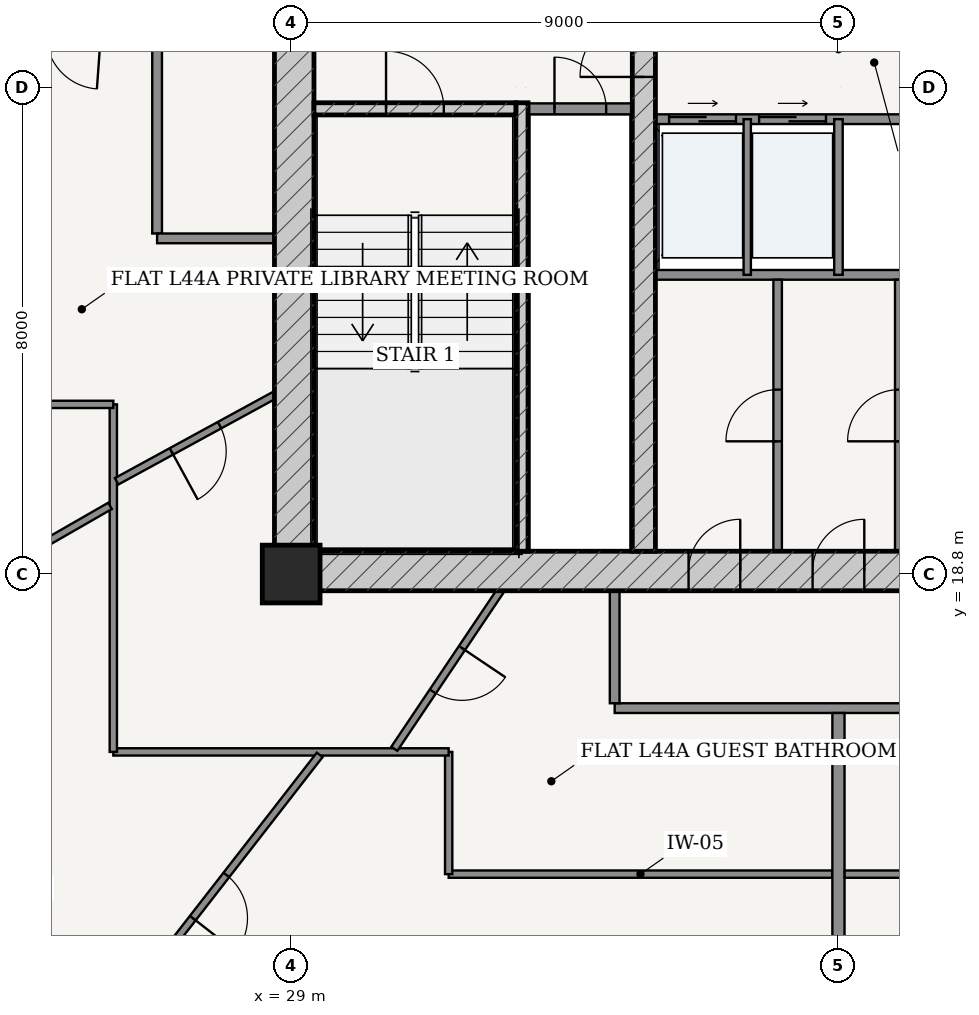
"""IFC4 building model, lengths in metres.
Left out: names, types, materials, properties, quantities, classifications, styles, units other than length and angle.
Written with IfcOpenShell. Run it as: python <this file> out.ifc"""

import sys

from ifc_helpers import new_model, si_unit, direction, frame, frame_2d, origin, origin_2d, place, context, subcontext, project, spatial, rectangle, extrude, source, transform, mapped, element, fill, save


model = new_model("IFC4")
c1 = context("Model", 3, precision=1e-05, world=origin(), true_north=direction((-0.2419218956, 0.970295726276)))
c2 = subcontext(c1, "Body", "Model", "MODEL_VIEW")
j1 = project(units=[si_unit("LENGTHUNIT", "METRE"), si_unit("PLANEANGLEUNIT", "RADIAN")], contexts=[c1])
p1 = place(None, origin())
s1 = spatial("IfcSite", under=j1, at=p1, CompositionType="ELEMENT")
p2 = place(p1, origin())
s2 = spatial("IfcBuilding", under=s1, at=p2, CompositionType="ELEMENT")
p3 = place(p2, frame((0.0, 0.0, 167.8)))
s3 = spatial("IfcBuildingStorey", under=s2, at=p3, CompositionType="ELEMENT", Elevation=167.8)
p4 = place(p3, frame((29.0, 18.8, 0.0), z_axis=(0.0, 0.0, 1.0), x_axis=(1.0, 0.0, 0.0)))
e1 = element("IfcColumn", 1, at=p4, inside=s3, PredefinedType="COLUMN", context=c2, shape_type="SweptSolid", body=[
    extrude(rectangle(XDim=0.95, YDim=0.95, at=origin_2d()), origin(), (0.0, 0.0, 1.0), 3.6),
])
p5 = place(p3, frame((28.725, 18.85, 0.0), z_axis=(0.0, 0.0, 1.0), x_axis=(1.0, 0.0, 0.0)))
e2 = element("IfcWall", 2, at=p5, inside=s3, PredefinedType="SHEAR", context=c2, shape_type="SweptSolid", body=[
    extrude(rectangle(XDim=18.55, YDim=0.65, at=frame_2d((9.275, 0.0))), origin(), (0.0, 0.0, 1.0), 3.33),
])
p6 = place(p5, frame((6.81, 0.0, 0.0)))
e3 = element("IfcOpeningElement", 3, at=p6, cuts=e2, PredefinedType="OPENING", context=c2, shape_type="SweptSolid", body=[
    extrude(rectangle(XDim=0.85, YDim=2.1, at=frame_2d((0.425, 1.05))), frame((0.0, 0.335, 0.0), z_axis=(0.0, -1.0, 0.0), x_axis=(1.0, 0.0, 0.0)), (0.0, 0.0, 1.0), 0.67),
])
p7 = place(p5, frame((8.85, 0.0, 0.0)))
e4 = element("IfcOpeningElement", 4, at=p7, cuts=e2, PredefinedType="OPENING", context=c2, shape_type="SweptSolid", body=[
    extrude(rectangle(XDim=0.85, YDim=2.1, at=frame_2d((0.425, 1.05))), frame((0.0, 0.335, 0.0), z_axis=(0.0, -1.0, 0.0), x_axis=(1.0, 0.0, 0.0)), (0.0, 0.0, 1.0), 0.67),
])
p8 = place(p5, frame((10.89, 0.0, 0.0)))
e5 = element("IfcOpeningElement", 5, at=p8, cuts=e2, PredefinedType="OPENING", context=c2, shape_type="SweptSolid", body=[
    extrude(rectangle(XDim=0.85, YDim=2.1, at=frame_2d((0.425, 1.05))), frame((0.0, 0.335, 0.0), z_axis=(0.0, -1.0, 0.0), x_axis=(1.0, 0.0, 0.0)), (0.0, 0.0, 1.0), 0.67),
])
p9 = place(p3, frame((29.05, 19.175, 0.0), z_axis=(0.0, 0.0, 1.0), x_axis=(0.0, 1.0, 0.0)))
e6 = element("IfcWall", 6, at=p9, inside=s3, PredefinedType="SHEAR", context=c2, shape_type="SweptSolid", body=[
    extrude(rectangle(XDim=15.25, YDim=0.65, at=frame_2d((7.625, 0.0))), origin(), (0.0, 0.0, 1.0), 3.33),
])
p10 = place(p9, frame((9.875, 0.0, 0.0)))
e7 = element("IfcOpeningElement", 7, at=p10, cuts=e6, PredefinedType="OPENING", context=c2, shape_type="SweptSolid", body=[
    extrude(rectangle(XDim=1.5, YDim=2.2, at=frame_2d((0.75, 1.1))), frame((0.0, 0.335, 0.0), z_axis=(0.0, -1.0, 0.0), x_axis=(1.0, 0.0, 0.0)), (0.0, 0.0, 1.0), 0.67),
])
p11 = place(p3, frame((32.795, 19.175, 0.0), z_axis=(0.0, 0.0, 1.0), x_axis=(0.0, 1.0, 0.0)))
e8 = element("IfcWall", 8, at=p11, inside=s3, PredefinedType="SOLIDWALL", context=c2, shape_type="SweptSolid", body=[
    extrude(rectangle(XDim=7.375, YDim=0.2, at=frame_2d((3.688, 0.0))), origin(), (0.0, 0.0, 1.0), 3.33),
])
p12 = place(p3, frame((29.375, 26.45, 0.0), z_axis=(0.0, 0.0, 1.0), x_axis=(1.0, 0.0, 0.0)))
e9 = element("IfcWall", 9, at=p12, inside=s3, PredefinedType="SOLIDWALL", context=c2, shape_type="SweptSolid", body=[
    extrude(rectangle(XDim=3.32, YDim=0.2, at=frame_2d((1.66, 0.0))), origin(), (0.0, 0.0, 1.0), 3.33),
])
p13 = place(p12, frame((1.185, 0.0, 0.0)))
e10 = element("IfcOpeningElement", 10, at=p13, cuts=e9, PredefinedType="OPENING", context=c2, shape_type="SweptSolid", body=[
    extrude(rectangle(XDim=0.95, YDim=2.15, at=frame_2d((0.475, 1.075))), frame((0.0, 0.11, 0.0), z_axis=(0.0, -1.0, 0.0), x_axis=(1.0, 0.0, 0.0)), (0.0, 0.0, 1.0), 0.22),
])
p14 = place(p3, frame((34.8, 19.175, 0.0), z_axis=(0.0, 0.0, 1.0), x_axis=(0.0, 1.0, 0.0)))
e11 = element("IfcWall", 11, at=p14, inside=s3, PredefinedType="SHEAR", context=c2, shape_type="SweptSolid", body=[
    extrude(rectangle(XDim=15.25, YDim=0.38, at=frame_2d((7.625, 0.0))), origin(), (0.0, 0.0, 1.0), 3.33),
])
p15 = place(p14, frame((7.8, 0.0, 0.0)))
e12 = element("IfcOpeningElement", 12, at=p15, cuts=e11, PredefinedType="OPENING", context=c2, shape_type="SweptSolid", body=[
    extrude(rectangle(XDim=1.05, YDim=2.15, at=frame_2d((0.525, 1.075))), frame((0.0, 0.2, 0.0), z_axis=(0.0, -1.0, 0.0), x_axis=(1.0, 0.0, 0.0)), (0.0, 0.0, 1.0), 0.4),
])
p16 = place(p3, frame((32.9, 26.45, 0.0), z_axis=(0.0, 0.0, 1.0), x_axis=(1.0, 0.0, 0.0)))
e13 = element("IfcWall", 13, at=p16, inside=s3, PredefinedType="PARTITIONING", context=c2, shape_type="SweptSolid", body=[
    extrude(rectangle(XDim=1.71, YDim=0.18, at=frame_2d((0.855, 0.0))), origin(), (0.0, 0.0, 1.0), 3.33),
])
p17 = place(p16, frame((0.43, 0.0, 0.0)))
e14 = element("IfcOpeningElement", 14, at=p17, cuts=e13, PredefinedType="OPENING", context=c2, shape_type="SweptSolid", body=[
    extrude(rectangle(XDim=0.85, YDim=2.1, at=frame_2d((0.425, 1.05))), frame((0.0, 0.1, 0.0), z_axis=(0.0, -1.0, 0.0), x_axis=(1.0, 0.0, 0.0)), (0.0, 0.0, 1.0), 0.2),
])
p18 = place(p3, frame((34.99, 26.28, 0.0), z_axis=(0.0, 0.0, 1.0), x_axis=(1.0, 0.0, 0.0)))
e15 = element("IfcWall", 15, at=p18, inside=s3, PredefinedType="PARTITIONING", context=c2, shape_type="SweptSolid", body=[
    extrude(rectangle(XDim=6.02, YDim=0.16, at=frame_2d((3.01, 0.0))), origin(), (0.0, 0.0, 1.0), 3.33),
])
p19 = place(p18, frame((0.225, 0.0, 0.0)))
e16 = element("IfcOpeningElement", 16, at=p19, cuts=e15, PredefinedType="OPENING", context=c2, shape_type="SweptSolid", body=[
    extrude(rectangle(XDim=1.1, YDim=2.2, at=frame_2d((0.55, 1.1))), frame((0.0, 0.09, 0.0), z_axis=(0.0, -1.0, 0.0), x_axis=(1.0, 0.0, 0.0)), (0.0, 0.0, 1.0), 0.18),
])
p20 = place(p18, frame((1.705, 0.0, 0.0)))
e17 = element("IfcOpeningElement", 17, at=p20, cuts=e15, PredefinedType="OPENING", context=c2, shape_type="SweptSolid", body=[
    extrude(rectangle(XDim=1.1, YDim=2.2, at=frame_2d((0.55, 1.1))), frame((0.0, 0.09, 0.0), z_axis=(0.0, -1.0, 0.0), x_axis=(1.0, 0.0, 0.0)), (0.0, 0.0, 1.0), 0.18),
])
p21 = place(p3, frame((34.99, 23.72, 0.0), z_axis=(0.0, 0.0, 1.0), x_axis=(1.0, 0.0, 0.0)))
e18 = element("IfcWall", 18, at=p21, inside=s3, PredefinedType="PARTITIONING", context=c2, shape_type="SweptSolid", body=[
    extrude(rectangle(XDim=6.02, YDim=0.16, at=frame_2d((3.01, 0.0))), origin(), (0.0, 0.0, 1.0), 3.33),
])
p22 = place(p3, frame((36.5, 23.72, 0.0), z_axis=(0.0, 0.0, 1.0), x_axis=(0.0, 1.0, 0.0)))
e19 = element("IfcWall", 19, at=p22, inside=s3, PredefinedType="PARTITIONING", context=c2, shape_type="SweptSolid", body=[
    extrude(rectangle(XDim=2.56, YDim=0.12, at=frame_2d((1.28, 0.0))), origin(), (0.0, 0.0, 1.0), 3.33),
])
p23 = place(p3, frame((38.0, 23.72, 0.0), z_axis=(0.0, 0.0, 1.0), x_axis=(0.0, 1.0, 0.0)))
e20 = element("IfcWall", 20, at=p23, inside=s3, PredefinedType="PARTITIONING", context=c2, shape_type="SweptSolid", body=[
    extrude(rectangle(XDim=2.56, YDim=0.14, at=frame_2d((1.28, 0.0))), origin(), (0.0, 0.0, 1.0), 3.33),
])
p24 = place(p3, frame((37.0, 19.175, 0.0), z_axis=(0.0, 0.0, 1.0), x_axis=(0.0, 1.0, 0.0)))
e21 = element("IfcWall", 21, at=p24, inside=s3, PredefinedType="PARTITIONING", context=c2, shape_type="SweptSolid", body=[
    extrude(rectangle(XDim=4.465, YDim=0.14, at=frame_2d((2.232, 0.0))), origin(), (0.0, 0.0, 1.0), 3.33),
])
p25 = place(p24, frame((1.808, 0.0, 0.0)))
e22 = element("IfcOpeningElement", 22, at=p25, cuts=e21, PredefinedType="OPENING", context=c2, shape_type="SweptSolid", body=[
    extrude(rectangle(XDim=0.85, YDim=2.1, at=frame_2d((0.425, 1.05))), frame((0.0, 0.08, 0.0), z_axis=(0.0, -1.0, 0.0), x_axis=(1.0, 0.0, 0.0)), (0.0, 0.0, 1.0), 0.16),
])
p26 = place(p3, frame((39.0, 19.175, 0.0), z_axis=(0.0, 0.0, 1.0), x_axis=(0.0, 1.0, 0.0)))
e23 = element("IfcWall", 23, at=p26, inside=s3, PredefinedType="PARTITIONING", context=c2, shape_type="SweptSolid", body=[
    extrude(rectangle(XDim=4.465, YDim=0.14, at=frame_2d((2.232, 0.0))), origin(), (0.0, 0.0, 1.0), 3.33),
])
p27 = place(p26, frame((1.808, 0.0, 0.0)))
e24 = element("IfcOpeningElement", 24, at=p27, cuts=e23, PredefinedType="OPENING", context=c2, shape_type="SweptSolid", body=[
    extrude(rectangle(XDim=0.85, YDim=2.1, at=frame_2d((0.425, 1.05))), frame((0.0, 0.08, 0.0), z_axis=(0.0, -1.0, 0.0), x_axis=(1.0, 0.0, 0.0)), (0.0, 0.0, 1.0), 0.16),
])
p28 = place(p3, frame((26.795, 24.4, 0.0), z_axis=(0.0, 0.0, 1.0), x_axis=(0.0, 1.0, 0.0)))
e25 = element("IfcWall", 25, at=p28, inside=s3, PredefinedType="PARTITIONING", context=c2, shape_type="SweptSolid", body=[
    extrude(rectangle(XDim=10.675, YDim=0.16, at=frame_2d((5.337, 0.0))), origin(), (0.0, 0.0, 1.0), 2.776),
])
p29 = place(p28, frame((8.514, 0.0, 0.0)))
e26 = element("IfcOpeningElement", 26, at=p29, cuts=e25, PredefinedType="OPENING", context=c2, shape_type="SweptSolid", body=[
    extrude(rectangle(XDim=0.98, YDim=2.2, at=frame_2d((0.49, 1.1))), frame((0.0, 0.09, 0.0), z_axis=(0.0, -1.0, 0.0), x_axis=(1.0, 0.0, 0.0)), (0.0, 0.0, 1.0), 0.18),
])
p30 = place(p3, frame((26.795, 24.32, 0.0), z_axis=(0.0, 0.0, 1.0), x_axis=(1.0, 0.0, 0.0)))
e27 = element("IfcWall", 27, at=p30, inside=s3, PredefinedType="PARTITIONING", context=c2, shape_type="SweptSolid", body=[
    extrude(rectangle(XDim=1.93, YDim=0.16, at=frame_2d((0.965, 0.0))), origin(), (0.0, 0.0, 1.0), 3.33),
])
p31 = place(p3, frame((34.32, 16.595, 0.0), z_axis=(0.0, 0.0, 1.0), x_axis=(1.0, 0.0, 0.0)))
e28 = element("IfcWall", 28, at=p31, inside=s3, PredefinedType="PARTITIONING", context=c2, shape_type="SweptSolid", body=[
    extrude(rectangle(XDim=14.885, YDim=0.16, at=frame_2d((7.442, 0.0))), origin(), (0.0, 0.0, 1.0), 2.776),
])
p32 = place(p31, frame((11.59, 0.0, 0.0)))
e29 = element("IfcOpeningElement", 29, at=p32, cuts=e28, PredefinedType="OPENING", context=c2, shape_type="SweptSolid", body=[
    extrude(rectangle(XDim=0.98, YDim=2.2, at=frame_2d((0.49, 1.1))), frame((0.0, 0.09, 0.0), z_axis=(0.0, -1.0, 0.0), x_axis=(1.0, 0.0, 0.0)), (0.0, 0.0, 1.0), 0.18),
])
p33 = place(p3, frame((34.32, 16.675, 0.0), z_axis=(0.0, 0.0, 1.0), x_axis=(0.0, 1.0, 0.0)))
e30 = element("IfcWall", 30, at=p33, inside=s3, PredefinedType="PARTITIONING", context=c2, shape_type="SweptSolid", body=[
    extrude(rectangle(XDim=1.85, YDim=0.16, at=frame_2d((0.925, 0.0))), origin(), (0.0, 0.0, 1.0), 3.33),
])
p34 = place(p3, frame((37.898, 13.865, 0.0), z_axis=(0.0, 0.0, 1.0), x_axis=(-1.0, 0.0, 0.0)))
e31 = element("IfcWall", 31, at=p34, inside=s3, PredefinedType="PARTITIONING", context=c2, shape_type="SweptSolid", body=[
    extrude(rectangle(XDim=6.308, YDim=0.12, at=frame_2d((3.154, 0.0))), origin(), (0.0, 0.0, 1.0), 2.776),
])
p35 = place(p3, frame((31.59, 13.865, 0.0), z_axis=(0.0, 0.0, 1.0), x_axis=(0.0, 1.0, 0.0)))
e32 = element("IfcWall", 32, at=p35, inside=s3, PredefinedType="PARTITIONING", context=c2, shape_type="SweptSolid", body=[
    extrude(rectangle(XDim=2.01, YDim=0.12, at=frame_2d((1.005, 0.0))), origin(), (0.0, 0.0, 1.0), 3.005),
])
p36 = place(p3, frame((31.59, 15.875, 0.0), z_axis=(0.0, 0.0, 1.0), x_axis=(-1.0, 0.0, 0.0)))
e33 = element("IfcWall", 33, at=p36, inside=s3, PredefinedType="PARTITIONING", context=c2, shape_type="SweptSolid", body=[
    extrude(rectangle(XDim=5.515, YDim=0.12, at=frame_2d((2.758, 0.0))), origin(), (0.0, 0.0, 1.0), 2.776),
])
p37 = place(p3, frame((26.075, 15.875, 0.0), z_axis=(0.0, 0.0, 1.0), x_axis=(0.0, 1.0, 0.0)))
e34 = element("IfcWall", 34, at=p37, inside=s3, PredefinedType="PARTITIONING", context=c2, shape_type="SweptSolid", body=[
    extrude(rectangle(XDim=5.715, YDim=0.12, at=frame_2d((2.857, 0.0))), origin(), (0.0, 0.0, 1.0), 2.776),
])
p38 = place(p3, frame((26.075, 21.59, 0.0), z_axis=(0.0, 0.0, 1.0), x_axis=(-1.0, 0.0, 0.0)))
e35 = element("IfcWall", 35, at=p38, inside=s3, PredefinedType="PARTITIONING", context=c2, shape_type="SweptSolid", body=[
    extrude(rectangle(XDim=2.01, YDim=0.12, at=frame_2d((1.005, 0.0))), origin(), (0.0, 0.0, 1.0), 3.33),
])
p39 = place(p3, frame((26.021, 19.921, 0.0), z_axis=(0.0, 0.0, 1.0), x_axis=(-0.867161148693, -0.498027652041, 0.0)))
e36 = element("IfcWall", 36, at=p39, inside=s3, PredefinedType="PARTITIONING", context=c2, shape_type="SweptSolid", body=[
    extrude(rectangle(XDim=9.279, YDim=0.12, at=frame_2d((4.64, 0.0))), origin(), (0.0, 0.0, 1.0), 2.776),
])
p40 = place(p39, frame((3.192, 0.0, 0.0)))
e37 = element("IfcOpeningElement", 37, at=p40, cuts=e36, PredefinedType="OPENING", context=c2, shape_type="SweptSolid", body=[
    extrude(rectangle(XDim=0.9, YDim=2.15, at=frame_2d((0.45, 1.075))), frame((0.0, 0.07, 0.0), z_axis=(0.0, -1.0, 0.0), x_axis=(1.0, 0.0, 0.0)), (0.0, 0.0, 1.0), 0.14),
])
p41 = place(p3, frame((29.469, 15.826, 0.0), z_axis=(0.0, 0.0, 1.0), x_axis=(-0.61373942367, -0.789508657225, 0.0)))
e38 = element("IfcWall", 38, at=p41, inside=s3, PredefinedType="PARTITIONING", context=c2, shape_type="SweptSolid", body=[
    extrude(rectangle(XDim=7.898, YDim=0.12, at=frame_2d((3.949, 0.0))), origin(), (0.0, 0.0, 1.0), 2.776),
])
p42 = place(p41, frame((2.5, 0.0, 0.0)))
e39 = element("IfcOpeningElement", 39, at=p42, cuts=e38, PredefinedType="OPENING", context=c2, shape_type="SweptSolid", body=[
    extrude(rectangle(XDim=0.9, YDim=2.15, at=frame_2d((0.45, 1.075))), frame((0.0, 0.07, 0.0), z_axis=(0.0, -1.0, 0.0), x_axis=(1.0, 0.0, 0.0)), (0.0, 0.0, 1.0), 0.14),
])
p43 = place(p3, frame((28.723, 21.74, 0.0), z_axis=(0.0, 0.0, 1.0), x_axis=(-0.877892414948, -0.47885792024, 0.0)))
e40 = element("IfcWall", 40, at=p43, inside=s3, PredefinedType="PARTITIONING", context=c2, shape_type="SweptSolid", body=[
    extrude(rectangle(XDim=2.955, YDim=0.12, at=frame_2d((1.477, 0.0))), origin(), (0.0, 0.0, 1.0), 3.33),
])
p44 = place(p43, frame((1.027, 0.0, 0.0)))
e41 = element("IfcOpeningElement", 41, at=p44, cuts=e40, PredefinedType="OPENING", context=c2, shape_type="SweptSolid", body=[
    extrude(rectangle(XDim=0.9, YDim=2.15, at=frame_2d((0.45, 1.075))), frame((0.0, 0.07, 0.0), z_axis=(0.0, -1.0, 0.0), x_axis=(1.0, 0.0, 0.0)), (0.0, 0.0, 1.0), 0.14),
])
p45 = place(p3, frame((32.441, 18.525, 0.0), z_axis=(0.0, 0.0, 1.0), x_axis=(-0.557594690071, -0.830113342625, 0.0)))
e42 = element("IfcWall", 42, at=p45, inside=s3, PredefinedType="PARTITIONING", context=c2, shape_type="SweptSolid", body=[
    extrude(rectangle(XDim=3.13, YDim=0.12, at=frame_2d((1.565, 0.0))), origin(), (0.0, 0.0, 1.0), 3.33),
])
p46 = place(p45, frame((1.135, 0.0, 0.0)))
e43 = element("IfcOpeningElement", 43, at=p46, cuts=e42, PredefinedType="OPENING", context=c2, shape_type="SweptSolid", body=[
    extrude(rectangle(XDim=0.86, YDim=2.15, at=frame_2d((0.43, 1.075))), frame((0.0, 0.07, 0.0), z_axis=(0.0, -1.0, 0.0), x_axis=(1.0, 0.0, 0.0)), (0.0, 0.0, 1.0), 0.14),
])
p47 = place(p3, frame((38.0, 16.515, 0.0), z_axis=(0.0, 0.0, 1.0), x_axis=(0.0, -1.0, 0.0)))
e44 = element("IfcWall", 44, at=p47, inside=s3, PredefinedType="PARTITIONING", context=c2, shape_type="SweptSolid", body=[
    extrude(rectangle(XDim=10.455, YDim=0.2, at=frame_2d((5.228, 0.0))), origin(), (0.0, 0.0, 1.0), 2.846),
])
p48 = place(p3, frame((51.935, 13.865, 0.0), z_axis=(0.0, 0.0, 1.0), x_axis=(-1.0, 0.0, 0.0)))
e45 = element("IfcWall", 45, at=p48, inside=s3, PredefinedType="PARTITIONING", context=c2, shape_type="SweptSolid", body=[
    extrude(rectangle(XDim=13.833, YDim=0.12, at=frame_2d((6.917, 0.0))), origin(), (0.0, 0.0, 1.0), 2.776),
])
p49 = place(p48, frame((3.009, 0.0, 0.0)))
e46 = element("IfcOpeningElement", 46, at=p49, cuts=e45, PredefinedType="OPENING", context=c2, shape_type="SweptSolid", body=[
    extrude(rectangle(XDim=0.9, YDim=2.15, at=frame_2d((0.45, 1.075))), frame((0.0, 0.07, 0.0), z_axis=(0.0, -1.0, 0.0), x_axis=(1.0, 0.0, 0.0)), (0.0, 0.0, 1.0), 0.14),
])
m1 = source(origin(), c2, "Body", "SweptSolid", [
    extrude(rectangle(XDim=1.05, YDim=2.15, at=frame_2d((0.525, 1.075))), frame((0.0, 0.025, 0.0), z_axis=(0.0, -1.0, 0.0), x_axis=(1.0, 0.0, 0.0)), (0.0, 0.0, 1.0), 0.05),
])
p50 = place(p15, origin())
e47 = element("IfcDoor", 47, at=p50, inside=s3, OperationType="SINGLE_SWING_LEFT", PredefinedType="DOOR", context=c2, shape_type="MappedRepresentation", body=[
    mapped(m1, transform((0.0, 0.0, 0.0), scale=1.0)),
])
fill(e12, e47)
m2 = source(origin(), c2, "Body", "SweptSolid", [
    extrude(rectangle(XDim=0.95, YDim=2.15, at=frame_2d((0.475, 1.075))), frame((0.0, 0.025, 0.0), z_axis=(0.0, -1.0, 0.0), x_axis=(1.0, 0.0, 0.0)), (0.0, 0.0, 1.0), 0.05),
])
p51 = place(p13, origin())
e48 = element("IfcDoor", 48, at=p51, inside=s3, OperationType="SINGLE_SWING_LEFT", PredefinedType="DOOR", context=c2, shape_type="MappedRepresentation", body=[
    mapped(m2, transform((0.0, 0.0, 0.0), scale=1.0)),
])
fill(e10, e48)
m3 = source(origin(), c2, "Body", "SweptSolid", [
    extrude(rectangle(XDim=0.85, YDim=2.1, at=frame_2d((0.425, 1.05))), frame((0.0, 0.025, 0.0), z_axis=(0.0, -1.0, 0.0), x_axis=(1.0, 0.0, 0.0)), (0.0, 0.0, 1.0), 0.05),
])
p52 = place(p17, origin())
e49 = element("IfcDoor", 49, at=p52, inside=s3, OperationType="SINGLE_SWING_LEFT", PredefinedType="DOOR", context=c2, shape_type="MappedRepresentation", body=[
    mapped(m3, transform((0.0, 0.0, 0.0), scale=1.0)),
])
fill(e14, e49)
p53 = place(p6, origin())
e50 = element("IfcDoor", 50, at=p53, inside=s3, OperationType="SINGLE_SWING_RIGHT", PredefinedType="DOOR", context=c2, shape_type="MappedRepresentation", body=[
    mapped(m3, transform((0.0, 0.0, 0.0), scale=1.0)),
])
fill(e3, e50)
p54 = place(p7, origin())
e51 = element("IfcDoor", 51, at=p54, inside=s3, OperationType="SINGLE_SWING_RIGHT", PredefinedType="DOOR", context=c2, shape_type="MappedRepresentation", body=[
    mapped(m3, transform((0.0, 0.0, 0.0), scale=1.0)),
])
fill(e4, e51)
p55 = place(p25, origin())
e52 = element("IfcDoor", 52, at=p55, inside=s3, OperationType="SINGLE_SWING_LEFT", PredefinedType="DOOR", context=c2, shape_type="MappedRepresentation", body=[
    mapped(m3, transform((0.0, 0.0, 0.0), scale=1.0)),
])
fill(e22, e52)
p56 = place(p27, origin())
e53 = element("IfcDoor", 53, at=p56, inside=s3, OperationType="SINGLE_SWING_LEFT", PredefinedType="DOOR", context=c2, shape_type="MappedRepresentation", body=[
    mapped(m3, transform((0.0, 0.0, 0.0), scale=1.0)),
])
fill(e24, e53)
m4 = source(origin(), c2, "Body", "SweptSolid", [
    extrude(rectangle(XDim=1.1, YDim=2.2, at=frame_2d((0.55, 1.1))), frame((0.0, 0.025, 0.0), z_axis=(0.0, -1.0, 0.0), x_axis=(1.0, 0.0, 0.0)), (0.0, 0.0, 1.0), 0.05),
])
p57 = place(p19, origin())
e54 = element("IfcDoor", 54, at=p57, inside=s3, OperationType="DOUBLE_DOOR_SLIDING", PredefinedType="DOOR", context=c2, shape_type="MappedRepresentation", body=[
    mapped(m4, transform((0.0, 0.0, 0.0), scale=1.0)),
])
fill(e16, e54)
p58 = place(p20, origin())
e55 = element("IfcDoor", 55, at=p58, inside=s3, OperationType="DOUBLE_DOOR_SLIDING", PredefinedType="DOOR", context=c2, shape_type="MappedRepresentation", body=[
    mapped(m4, transform((0.0, 0.0, 0.0), scale=1.0)),
])
fill(e17, e55)
m5 = source(origin(), c2, "Body", "SweptSolid", [
    extrude(rectangle(XDim=0.9, YDim=2.15, at=frame_2d((0.45, 1.075))), frame((0.0, 0.025, 0.0), z_axis=(0.0, -1.0, 0.0), x_axis=(1.0, 0.0, 0.0)), (0.0, 0.0, 1.0), 0.05),
])
p59 = place(p44, origin())
e56 = element("IfcDoor", 56, at=p59, inside=s3, OperationType="SINGLE_SWING_RIGHT", PredefinedType="DOOR", context=c2, shape_type="MappedRepresentation", body=[
    mapped(m5, transform((0.0, 0.0, 0.0), scale=1.0)),
])
fill(e41, e56)
m6 = source(origin(), c2, "Body", "SweptSolid", [
    extrude(rectangle(XDim=0.86, YDim=2.15, at=frame_2d((0.43, 1.075))), frame((0.0, 0.025, 0.0), z_axis=(0.0, -1.0, 0.0), x_axis=(1.0, 0.0, 0.0)), (0.0, 0.0, 1.0), 0.05),
])
p60 = place(p46, origin())
e57 = element("IfcDoor", 57, at=p60, inside=s3, OperationType="SINGLE_SWING_LEFT", PredefinedType="DOOR", context=c2, shape_type="MappedRepresentation", body=[
    mapped(m6, transform((0.0, 0.0, 0.0), scale=1.0)),
])
fill(e43, e57)
p61 = place(p42, origin())
e58 = element("IfcDoor", 58, at=p61, inside=s3, OperationType="SINGLE_SWING_RIGHT", PredefinedType="DOOR", context=c2, shape_type="MappedRepresentation", body=[
    mapped(m5, transform((0.0, 0.0, 0.0), scale=1.0)),
])
fill(e39, e58)
save(model, sys.argv[1])
